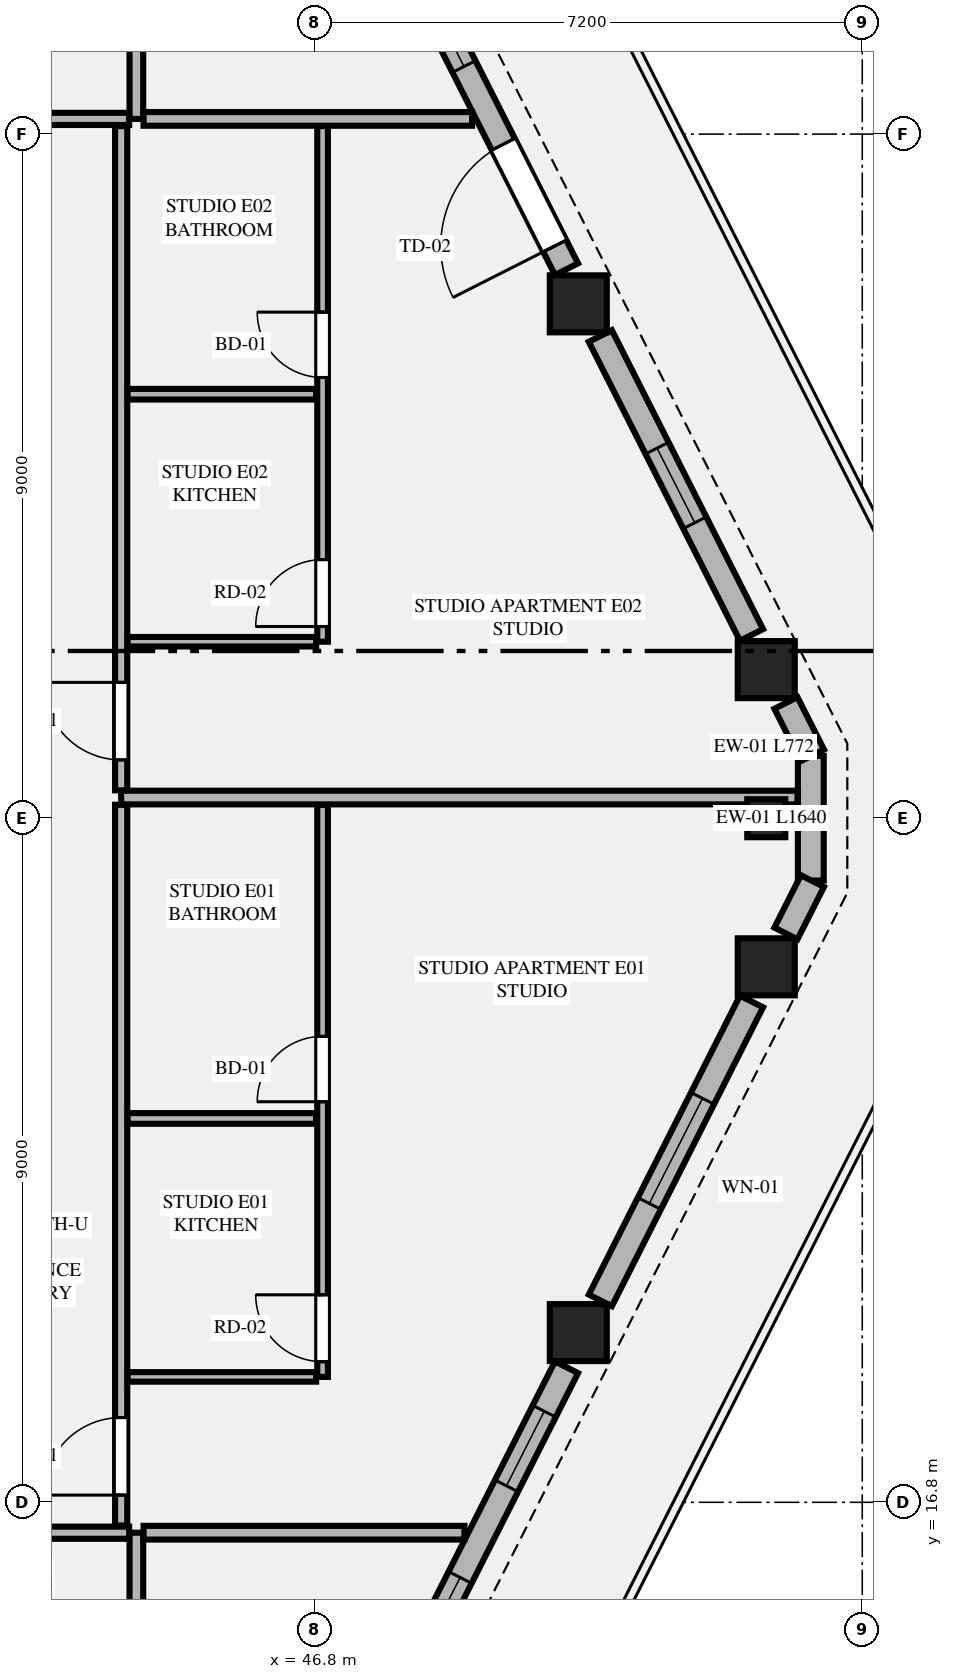
"""IFC4 building model, lengths in metres.
Left out: names, types, materials, properties, quantities, classifications, styles, units other than length and angle.
Written with IfcOpenShell. Run it as: python <this file> out.ifc"""

import sys

from ifc_helpers import new_model, si_unit, direction, frame, frame_2d, origin, origin_2d, place, context, subcontext, project, spatial, rectangle, extrude, element, fill, save


model = new_model("IFC4")
c1 = context("Model", 3, precision=1e-05, world=origin(), true_north=direction((0.0, 1.0)))
c2 = subcontext(c1, "Body", "Model", "MODEL_VIEW")
j1 = project(units=[si_unit("LENGTHUNIT", "METRE"), si_unit("PLANEANGLEUNIT", "RADIAN")], contexts=[c1])
p1 = place(None, origin())
s1 = spatial("IfcSite", under=j1, at=p1, CompositionType="ELEMENT")
p2 = place(p1, origin())
s2 = spatial("IfcBuilding", under=s1, at=p2, CompositionType="ELEMENT")
p3 = place(p2, frame((0.0, 0.0, 227.0)))
s3 = spatial("IfcBuildingStorey", under=s2, at=p3, CompositionType="ELEMENT", Elevation=227.0)
for number, where, z_axis, x_axis in (
    (1, (50.264, 19.033, 0.0), (0.0, 0.0, 1.0), (1.0, 0.0, 0.0)),
    (2, (52.737, 23.845, 0.0), (0.0, 0.0, 1.0), (1.0, 0.0, 0.0)),
    (3, (52.737, 27.755, 0.0), (0.0, 0.0, 1.0), (1.0, 0.0, 0.0)),
    (4, (50.264, 32.567, 0.0), (0.0, 0.0, 1.0), (1.0, 0.0, 0.0)),
):
    element("IfcColumn", number, at=place(p3, frame(where, z_axis=z_axis, x_axis=x_axis)), inside=s3, PredefinedType="COLUMN", context=c2, shape_type="SweptSolid", body=[
        extrude(rectangle(XDim=0.75, YDim=0.75, at=origin_2d()), origin(), (0.0, 0.0, 1.0), 3.65),
    ])
p4 = place(p3, frame((52.737, 25.8, 0.0), z_axis=(0.0, 0.0, 1.0), x_axis=(0.0, 1.0, 0.0)))
e5 = element("IfcColumn", 5, at=p4, inside=s3, PredefinedType="PILASTER", context=c2, shape_type="SweptSolid", body=[
    extrude(rectangle(XDim=0.5, YDim=0.35, at=origin_2d()), origin(), (0.0, 0.0, 1.0), 3.65),
])
p5 = place(p3, frame((53.323, 24.98, 0.0), z_axis=(0.0, 0.0, 1.0), x_axis=(0.0, 1.0, 0.0)))
e6 = element("IfcWall", 6, at=p5, inside=s3, PredefinedType="STANDARD", context=c2, shape_type="SweptSolid", body=[
    extrude(rectangle(XDim=1.64, YDim=0.34, at=frame_2d((0.82, 0.0))), origin(), (0.0, 0.0, 1.0), 3.45),
])
p6 = place(p3, frame((48.032, 14.473, 0.0), z_axis=(0.0, 0.0, 1.0), x_axis=(0.451539564999, 0.892251097641, 0.0)))
e7 = element("IfcWall", 7, at=p6, inside=s3, PredefinedType="STANDARD", context=c2, shape_type="SweptSolid", body=[
    extrude(rectangle(XDim=4.6, YDim=0.34, at=frame_2d((2.3, 0.0))), origin(), (0.0, 0.0, 1.0), 2.983),
])
p7 = place(p6, frame((0.4, 0.0, 0.75)))
e8 = element("IfcOpeningElement", 8, at=p7, cuts=e7, PredefinedType="OPENING", context=c2, shape_type="SweptSolid", body=[
    extrude(rectangle(XDim=1.1, YDim=2.0, at=frame_2d((0.55, 1.0))), frame((0.0, 0.18, 0.0), z_axis=(0.0, -1.0, 0.0), x_axis=(1.0, 0.0, 0.0)), (0.0, 0.0, 1.0), 0.36),
])
p8 = place(p6, frame((2.851, 0.0, 0.75)))
e9 = element("IfcOpeningElement", 9, at=p8, cuts=e7, PredefinedType="OPENING", context=c2, shape_type="SweptSolid", body=[
    extrude(rectangle(XDim=1.1, YDim=2.0, at=frame_2d((0.55, 1.0))), frame((0.0, 0.18, 0.0), z_axis=(0.0, -1.0, 0.0), x_axis=(1.0, 0.0, 0.0)), (0.0, 0.0, 1.0), 0.36),
])
p9 = place(p3, frame((50.554, 19.456, 0.0), z_axis=(0.0, 0.0, 1.0), x_axis=(0.45130817501, 0.892368158984, 0.0)))
e10 = element("IfcWall", 10, at=p9, inside=s3, PredefinedType="STANDARD", context=c2, shape_type="SweptSolid", body=[
    extrude(rectangle(XDim=4.407, YDim=0.34, at=frame_2d((2.204, 0.0))), origin(), (0.0, 0.0, 1.0), 2.983),
])
p10 = place(p9, frame((1.429, 0.0, 0.75)))
e11 = element("IfcOpeningElement", 11, at=p10, cuts=e10, PredefinedType="OPENING", context=c2, shape_type="SweptSolid", body=[
    extrude(rectangle(XDim=1.55, YDim=2.05, at=frame_2d((0.775, 1.025))), frame((0.0, 0.18, 0.0), z_axis=(0.0, -1.0, 0.0), x_axis=(1.0, 0.0, 0.0)), (0.0, 0.0, 1.0), 0.36),
])
for number, where, z_axis, x_axis in (
    (12, (52.996, 24.284, 0.0), (0.0, 0.0, 1.0), (0.451, 0.893, 0.0)),
    (13, (53.344, 26.627, 0.0), (0.0, 0.0, 1.0), (-0.451, 0.893, 0.0)),
):
    element("IfcWall", number, at=place(p3, frame(where, z_axis=z_axis, x_axis=x_axis)), inside=s3, PredefinedType="STANDARD", context=c2, shape_type="SweptSolid", body=[
        extrude(rectangle(XDim=0.772, YDim=0.34, at=frame_2d((0.386, 0.0))), origin(), (0.0, 0.0, 1.0), 3.45),
    ])
p11 = place(p3, frame((52.543, 28.211, 0.0), z_axis=(0.0, 0.0, 1.0), x_axis=(-0.451285866323, 0.892379441077, 0.0)))
e14 = element("IfcWall", 14, at=p11, inside=s3, PredefinedType="STANDARD", context=c2, shape_type="SweptSolid", body=[
    extrude(rectangle(XDim=4.407, YDim=0.34, at=frame_2d((2.204, 0.0))), origin(), (0.0, 0.0, 1.0), 2.983),
])
p12 = place(p11, frame((1.654, 0.0, 0.75)))
e15 = element("IfcOpeningElement", 15, at=p12, cuts=e14, PredefinedType="OPENING", context=c2, shape_type="SweptSolid", body=[
    extrude(rectangle(XDim=1.1, YDim=2.0, at=frame_2d((0.55, 1.0))), frame((0.0, 0.18, 0.0), z_axis=(0.0, -1.0, 0.0), x_axis=(1.0, 0.0, 0.0)), (0.0, 0.0, 1.0), 0.36),
])
p13 = place(p3, frame((50.109, 33.023, 0.0), z_axis=(0.0, 0.0, 1.0), x_axis=(-0.451539564999, 0.892251097641, 0.0)))
e16 = element("IfcWall", 16, at=p13, inside=s3, PredefinedType="STANDARD", context=c2, shape_type="SweptSolid", body=[
    extrude(rectangle(XDim=4.6, YDim=0.34, at=frame_2d((2.3, 0.0))), origin(), (0.0, 0.0, 1.0), 2.983),
])
p14 = place(p13, frame((0.342, 0.0, 0.0)))
e17 = element("IfcOpeningElement", 17, at=p14, cuts=e16, PredefinedType="OPENING", context=c2, shape_type="SweptSolid", body=[
    extrude(rectangle(XDim=1.5, YDim=2.3, at=frame_2d((0.75, 1.15))), frame((0.0, 0.18, 0.0), z_axis=(0.0, -1.0, 0.0), x_axis=(1.0, 0.0, 0.0)), (0.0, 0.0, 1.0), 0.36),
])
p15 = place(p13, frame((2.988, 0.0, 0.75)))
e18 = element("IfcOpeningElement", 18, at=p15, cuts=e16, PredefinedType="OPENING", context=c2, shape_type="SweptSolid", body=[
    extrude(rectangle(XDim=1.1, YDim=2.0, at=frame_2d((0.55, 1.0))), frame((0.0, 0.18, 0.0), z_axis=(0.0, -1.0, 0.0), x_axis=(1.0, 0.0, 0.0)), (0.0, 0.0, 1.0), 0.36),
])
p16 = place(p3, frame((44.45, 8.119, 0.0), z_axis=(0.0, 0.0, 1.0), x_axis=(0.0, 1.0, 0.0)))
e19 = element("IfcWall", 19, at=p16, inside=s3, PredefinedType="PARTITIONING", context=c2, shape_type="SweptSolid", body=[
    extrude(rectangle(XDim=8.281, YDim=0.18, at=frame_2d((4.141, 0.0))), origin(), (0.0, 0.0, 1.0), 3.45),
])
p17 = place(p3, frame((35.749, 16.4, 0.0), z_axis=(0.0, 0.0, 1.0), x_axis=(1.0, 0.0, 0.0)))
e20 = element("IfcWall", 20, at=p17, inside=s3, PredefinedType="PARTITIONING", context=c2, shape_type="SweptSolid", body=[
    extrude(rectangle(XDim=8.606, YDim=0.16, at=frame_2d((4.303, 0.0))), origin(), (0.0, 0.0, 1.0), 3.45),
])
p18 = place(p17, frame((0.355, 0.0, 0.0)))
e21 = element("IfcOpeningElement", 21, at=p18, cuts=e20, PredefinedType="OPENING", context=c2, shape_type="SweptSolid", body=[
    extrude(rectangle(XDim=1.02, YDim=2.25, at=frame_2d((0.51, 1.125))), frame((0.0, 0.09, 0.0), z_axis=(0.0, -1.0, 0.0), x_axis=(1.0, 0.0, 0.0)), (0.0, 0.0, 1.0), 0.18),
])
p19 = place(p3, frame((44.45, 35.0, 0.0), z_axis=(0.0, 0.0, 1.0), x_axis=(0.0, 1.0, 0.0)))
e22 = element("IfcWall", 22, at=p19, inside=s3, PredefinedType="PARTITIONING", context=c2, shape_type="SweptSolid", body=[
    extrude(rectangle(XDim=8.481, YDim=0.18, at=frame_2d((4.24, 0.0))), origin(), (0.0, 0.0, 1.0), 3.45),
])
p20 = place(p3, frame((35.749, 35.0, 0.0), z_axis=(0.0, 0.0, 1.0), x_axis=(1.0, 0.0, 0.0)))
e23 = element("IfcWall", 23, at=p20, inside=s3, PredefinedType="PARTITIONING", context=c2, shape_type="SweptSolid", body=[
    extrude(rectangle(XDim=8.606, YDim=0.16, at=frame_2d((4.303, 0.0))), origin(), (0.0, 0.0, 1.0), 3.45),
])
p21 = place(p20, frame((6.351, 0.0, 0.0)))
e24 = element("IfcOpeningElement", 24, at=p21, cuts=e23, PredefinedType="OPENING", context=c2, shape_type="SweptSolid", body=[
    extrude(rectangle(XDim=1.02, YDim=2.25, at=frame_2d((0.51, 1.125))), frame((0.0, 0.09, 0.0), z_axis=(0.0, -1.0, 0.0), x_axis=(1.0, 0.0, 0.0)), (0.0, 0.0, 1.0), 0.18),
])
p22 = place(p3, frame((44.545, 16.4, 0.0), z_axis=(0.0, 0.0, 1.0), x_axis=(1.0, 0.0, 0.0)))
e25 = element("IfcWall", 25, at=p22, inside=s3, PredefinedType="PARTITIONING", context=c2, shape_type="SweptSolid", body=[
    extrude(rectangle(XDim=4.221, YDim=0.18, at=frame_2d((2.111, 0.0))), origin(), (0.0, 0.0, 1.0), 3.45),
])
p23 = place(p3, frame((44.545, 35.0, 0.0), z_axis=(0.0, 0.0, 1.0), x_axis=(1.0, 0.0, 0.0)))
e26 = element("IfcWall", 26, at=p23, inside=s3, PredefinedType="PARTITIONING", context=c2, shape_type="SweptSolid", body=[
    extrude(rectangle(XDim=4.322, YDim=0.18, at=frame_2d((2.161, 0.0))), origin(), (0.0, 0.0, 1.0), 3.45),
])
p24 = place(p3, frame((44.25, 16.495, 0.0), z_axis=(0.0, 0.0, 1.0), x_axis=(0.0, 1.0, 0.0)))
e27 = element("IfcWall", 27, at=p24, inside=s3, PredefinedType="PARTITIONING", context=c2, shape_type="SweptSolid", body=[
    extrude(rectangle(XDim=9.482, YDim=0.16, at=frame_2d((4.741, 0.0))), origin(), (0.0, 0.0, 1.0), 3.137),
])
p25 = place(p24, frame((0.4, 0.0, 0.0)))
e28 = element("IfcOpeningElement", 28, at=p25, cuts=e27, PredefinedType="OPENING", context=c2, shape_type="SweptSolid", body=[
    extrude(rectangle(XDim=1.02, YDim=2.25, at=frame_2d((0.51, 1.125))), frame((0.0, 0.09, 0.0), z_axis=(0.0, -1.0, 0.0), x_axis=(1.0, 0.0, 0.0)), (0.0, 0.0, 1.0), 0.18),
])
p26 = place(p3, frame((44.335, 18.45, 0.0), z_axis=(0.0, 0.0, 1.0), x_axis=(1.0, 0.0, 0.0)))
e29 = element("IfcWall", 29, at=p26, inside=s3, PredefinedType="PARTITIONING", context=c2, shape_type="SweptSolid", body=[
    extrude(rectangle(XDim=2.48, YDim=0.125, at=frame_2d((1.24, 0.0))), origin(), (0.0, 0.0, 1.0), 3.45),
])
p27 = place(p3, frame((46.9, 18.45, 0.0), z_axis=(0.0, 0.0, 1.0), x_axis=(0.0, 1.0, 0.0)))
e30 = element("IfcWall", 30, at=p27, inside=s3, PredefinedType="PLUMBINGWALL", context=c2, shape_type="SweptSolid", body=[
    extrude(rectangle(XDim=7.527, YDim=0.14, at=frame_2d((3.764, 0.0))), origin(), (0.0, 0.0, 1.0), 3.45),
])
p28 = place(p27, frame((3.62, 0.0, 0.0)))
e31 = element("IfcOpeningElement", 31, at=p28, cuts=e30, PredefinedType="OPENING", context=c2, shape_type="SweptSolid", body=[
    extrude(rectangle(XDim=0.86, YDim=2.1, at=frame_2d((0.43, 1.05))), frame((0.0, 0.08, 0.0), z_axis=(0.0, -1.0, 0.0), x_axis=(1.0, 0.0, 0.0)), (0.0, 0.0, 1.0), 0.16),
])
p29 = place(p27, frame((0.2, 0.0, 0.0)))
e32 = element("IfcOpeningElement", 32, at=p29, cuts=e30, PredefinedType="OPENING", context=c2, shape_type="SweptSolid", body=[
    extrude(rectangle(XDim=0.88, YDim=2.15, at=frame_2d((0.44, 1.075))), frame((0.0, 0.08, 0.0), z_axis=(0.0, -1.0, 0.0), x_axis=(1.0, 0.0, 0.0)), (0.0, 0.0, 1.0), 0.16),
])
p30 = place(p3, frame((44.335, 21.85, 0.0), z_axis=(0.0, 0.0, 1.0), x_axis=(1.0, 0.0, 0.0)))
e33 = element("IfcWall", 33, at=p30, inside=s3, PredefinedType="PLUMBINGWALL", context=c2, shape_type="SweptSolid", body=[
    extrude(rectangle(XDim=2.48, YDim=0.14, at=frame_2d((1.24, 0.0))), origin(), (0.0, 0.0, 1.0), 3.45),
])
p31 = place(p3, frame((44.25, 26.072, 0.0), z_axis=(0.0, 0.0, 1.0), x_axis=(1.0, 0.0, 0.0)))
e34 = element("IfcWall", 34, at=p31, inside=s3, PredefinedType="PARTITIONING", context=c2, shape_type="SweptSolid", body=[
    extrude(rectangle(XDim=8.898, YDim=0.18, at=frame_2d((4.449, 0.0))), origin(), (0.0, 0.0, 1.0), 3.45),
])
p32 = place(p3, frame((44.25, 26.167, 0.0), z_axis=(0.0, 0.0, 1.0), x_axis=(0.0, 1.0, 0.0)))
e35 = element("IfcWall", 35, at=p32, inside=s3, PredefinedType="PARTITIONING", context=c2, shape_type="SweptSolid", body=[
    extrude(rectangle(XDim=8.738, YDim=0.16, at=frame_2d((4.369, 0.0))), origin(), (0.0, 0.0, 1.0), 3.137),
])
p33 = place(p32, frame((0.4, 0.0, 0.0)))
e36 = element("IfcOpeningElement", 36, at=p33, cuts=e35, PredefinedType="OPENING", context=c2, shape_type="SweptSolid", body=[
    extrude(rectangle(XDim=1.02, YDim=2.25, at=frame_2d((0.51, 1.125))), frame((0.0, 0.09, 0.0), z_axis=(0.0, -1.0, 0.0), x_axis=(1.0, 0.0, 0.0)), (0.0, 0.0, 1.0), 0.18),
])
p34 = place(p3, frame((44.335, 28.122, 0.0), z_axis=(0.0, 0.0, 1.0), x_axis=(1.0, 0.0, 0.0)))
e37 = element("IfcWall", 37, at=p34, inside=s3, PredefinedType="PARTITIONING", context=c2, shape_type="SweptSolid", body=[
    extrude(rectangle(XDim=2.48, YDim=0.125, at=frame_2d((1.24, 0.0))), origin(), (0.0, 0.0, 1.0), 3.45),
])
p35 = place(p3, frame((46.9, 28.122, 0.0), z_axis=(0.0, 0.0, 1.0), x_axis=(0.0, 1.0, 0.0)))
e38 = element("IfcWall", 38, at=p35, inside=s3, PredefinedType="PLUMBINGWALL", context=c2, shape_type="SweptSolid", body=[
    extrude(rectangle(XDim=6.783, YDim=0.14, at=frame_2d((3.392, 0.0))), origin(), (0.0, 0.0, 1.0), 3.45),
])
p36 = place(p35, frame((3.476, 0.0, 0.0)))
e39 = element("IfcOpeningElement", 39, at=p36, cuts=e38, PredefinedType="OPENING", context=c2, shape_type="SweptSolid", body=[
    extrude(rectangle(XDim=0.86, YDim=2.1, at=frame_2d((0.43, 1.05))), frame((0.0, 0.08, 0.0), z_axis=(0.0, -1.0, 0.0), x_axis=(1.0, 0.0, 0.0)), (0.0, 0.0, 1.0), 0.16),
])
p37 = place(p35, frame((0.2, 0.0, 0.0)))
e40 = element("IfcOpeningElement", 40, at=p37, cuts=e38, PredefinedType="OPENING", context=c2, shape_type="SweptSolid", body=[
    extrude(rectangle(XDim=0.88, YDim=2.15, at=frame_2d((0.44, 1.075))), frame((0.0, 0.08, 0.0), z_axis=(0.0, -1.0, 0.0), x_axis=(1.0, 0.0, 0.0)), (0.0, 0.0, 1.0), 0.16),
])
p38 = place(p3, frame((44.335, 31.378, 0.0), z_axis=(0.0, 0.0, 1.0), x_axis=(1.0, 0.0, 0.0)))
e41 = element("IfcWall", 41, at=p38, inside=s3, PredefinedType="PLUMBINGWALL", context=c2, shape_type="SweptSolid", body=[
    extrude(rectangle(XDim=2.48, YDim=0.14, at=frame_2d((1.24, 0.0))), origin(), (0.0, 0.0, 1.0), 3.45),
])
p39 = place(p7, origin())
e42 = element("IfcWindow", 42, at=p39, inside=s3, PartitioningType="SINGLE_PANEL", PredefinedType="WINDOW", context=c2, shape_type="SweptSolid", body=[
    extrude(rectangle(XDim=1.1, YDim=2.0, at=frame_2d((0.55, 1.0))), frame((0.0, 0.03, 0.0), z_axis=(0.0, -1.0, 0.0), x_axis=(1.0, 0.0, 0.0)), (0.0, 0.0, 1.0), 0.06),
])
fill(e8, e42)
p40 = place(p10, origin())
e43 = element("IfcWindow", 43, at=p40, inside=s3, PartitioningType="SINGLE_PANEL", PredefinedType="WINDOW", context=c2, shape_type="SweptSolid", body=[
    extrude(rectangle(XDim=1.55, YDim=2.05, at=frame_2d((0.775, 1.025))), frame((0.0, 0.03, 0.0), z_axis=(0.0, -1.0, 0.0), x_axis=(1.0, 0.0, 0.0)), (0.0, 0.0, 1.0), 0.06),
])
fill(e11, e43)
p41 = place(p12, origin())
e44 = element("IfcWindow", 44, at=p41, inside=s3, PartitioningType="SINGLE_PANEL", PredefinedType="WINDOW", context=c2, shape_type="SweptSolid", body=[
    extrude(rectangle(XDim=1.1, YDim=2.0, at=frame_2d((0.55, 1.0))), frame((0.0, 0.03, 0.0), z_axis=(0.0, -1.0, 0.0), x_axis=(1.0, 0.0, 0.0)), (0.0, 0.0, 1.0), 0.06),
])
fill(e15, e44)
p42 = place(p14, origin())
e45 = element("IfcDoor", 45, at=p42, inside=s3, OperationType="SINGLE_SWING_LEFT", PredefinedType="DOOR", context=c2, shape_type="SweptSolid", body=[
    extrude(rectangle(XDim=1.5, YDim=2.3, at=frame_2d((0.75, 1.15))), frame((0.0, 0.025, 0.0), z_axis=(0.0, -1.0, 0.0), x_axis=(1.0, 0.0, 0.0)), (0.0, 0.0, 1.0), 0.05),
])
fill(e17, e45)
p43 = place(p28, origin())
e46 = element("IfcDoor", 46, at=p43, inside=s3, OperationType="SINGLE_SWING_LEFT", PredefinedType="DOOR", context=c2, shape_type="SweptSolid", body=[
    extrude(rectangle(XDim=0.86, YDim=2.1, at=frame_2d((0.43, 1.05))), frame((0.0, 0.025, 0.0), z_axis=(0.0, -1.0, 0.0), x_axis=(1.0, 0.0, 0.0)), (0.0, 0.0, 1.0), 0.05),
])
fill(e31, e46)
p44 = place(p25, origin())
e47 = element("IfcDoor", 47, at=p44, inside=s3, OperationType="SINGLE_SWING_LEFT", PredefinedType="DOOR", context=c2, shape_type="SweptSolid", body=[
    extrude(rectangle(XDim=1.02, YDim=2.25, at=frame_2d((0.51, 1.125))), frame((0.0, 0.025, 0.0), z_axis=(0.0, -1.0, 0.0), x_axis=(1.0, 0.0, 0.0)), (0.0, 0.0, 1.0), 0.05),
])
fill(e28, e47)
p45 = place(p29, origin())
e48 = element("IfcDoor", 48, at=p45, inside=s3, OperationType="SINGLE_SWING_RIGHT", PredefinedType="DOOR", context=c2, shape_type="SweptSolid", body=[
    extrude(rectangle(XDim=0.88, YDim=2.15, at=frame_2d((0.44, 1.075))), frame((0.0, 0.025, 0.0), z_axis=(0.0, -1.0, 0.0), x_axis=(1.0, 0.0, 0.0)), (0.0, 0.0, 1.0), 0.05),
])
fill(e32, e48)
p46 = place(p36, origin())
e49 = element("IfcDoor", 49, at=p46, inside=s3, OperationType="SINGLE_SWING_RIGHT", PredefinedType="DOOR", context=c2, shape_type="SweptSolid", body=[
    extrude(rectangle(XDim=0.86, YDim=2.1, at=frame_2d((0.43, 1.05))), frame((0.0, 0.025, 0.0), z_axis=(0.0, -1.0, 0.0), x_axis=(1.0, 0.0, 0.0)), (0.0, 0.0, 1.0), 0.05),
])
fill(e39, e49)
p47 = place(p33, origin())
e50 = element("IfcDoor", 50, at=p47, inside=s3, OperationType="SINGLE_SWING_RIGHT", PredefinedType="DOOR", context=c2, shape_type="SweptSolid", body=[
    extrude(rectangle(XDim=1.02, YDim=2.25, at=frame_2d((0.51, 1.125))), frame((0.0, 0.025, 0.0), z_axis=(0.0, -1.0, 0.0), x_axis=(1.0, 0.0, 0.0)), (0.0, 0.0, 1.0), 0.05),
])
fill(e36, e50)
p48 = place(p37, origin())
e51 = element("IfcDoor", 51, at=p48, inside=s3, OperationType="SINGLE_SWING_LEFT", PredefinedType="DOOR", context=c2, shape_type="SweptSolid", body=[
    extrude(rectangle(XDim=0.88, YDim=2.15, at=frame_2d((0.44, 1.075))), frame((0.0, 0.025, 0.0), z_axis=(0.0, -1.0, 0.0), x_axis=(1.0, 0.0, 0.0)), (0.0, 0.0, 1.0), 0.05),
])
fill(e40, e51)
p49 = place(p8, origin())
e52 = element("IfcWindow", 52, at=p49, inside=s3, PartitioningType="SINGLE_PANEL", PredefinedType="WINDOW", context=c2, shape_type="SweptSolid", body=[
    extrude(rectangle(XDim=1.1, YDim=2.0, at=frame_2d((0.55, 1.0))), frame((0.0, 0.03, 0.0), z_axis=(0.0, -1.0, 0.0), x_axis=(1.0, 0.0, 0.0)), (0.0, 0.0, 1.0), 0.06),
])
fill(e9, e52)
p50 = place(p15, origin())
e53 = element("IfcWindow", 53, at=p50, inside=s3, PartitioningType="SINGLE_PANEL", PredefinedType="WINDOW", context=c2, shape_type="SweptSolid", body=[
    extrude(rectangle(XDim=1.1, YDim=2.0, at=frame_2d((0.55, 1.0))), frame((0.0, 0.03, 0.0), z_axis=(0.0, -1.0, 0.0), x_axis=(1.0, 0.0, 0.0)), (0.0, 0.0, 1.0), 0.06),
])
fill(e18, e53)
save(model, sys.argv[1])
